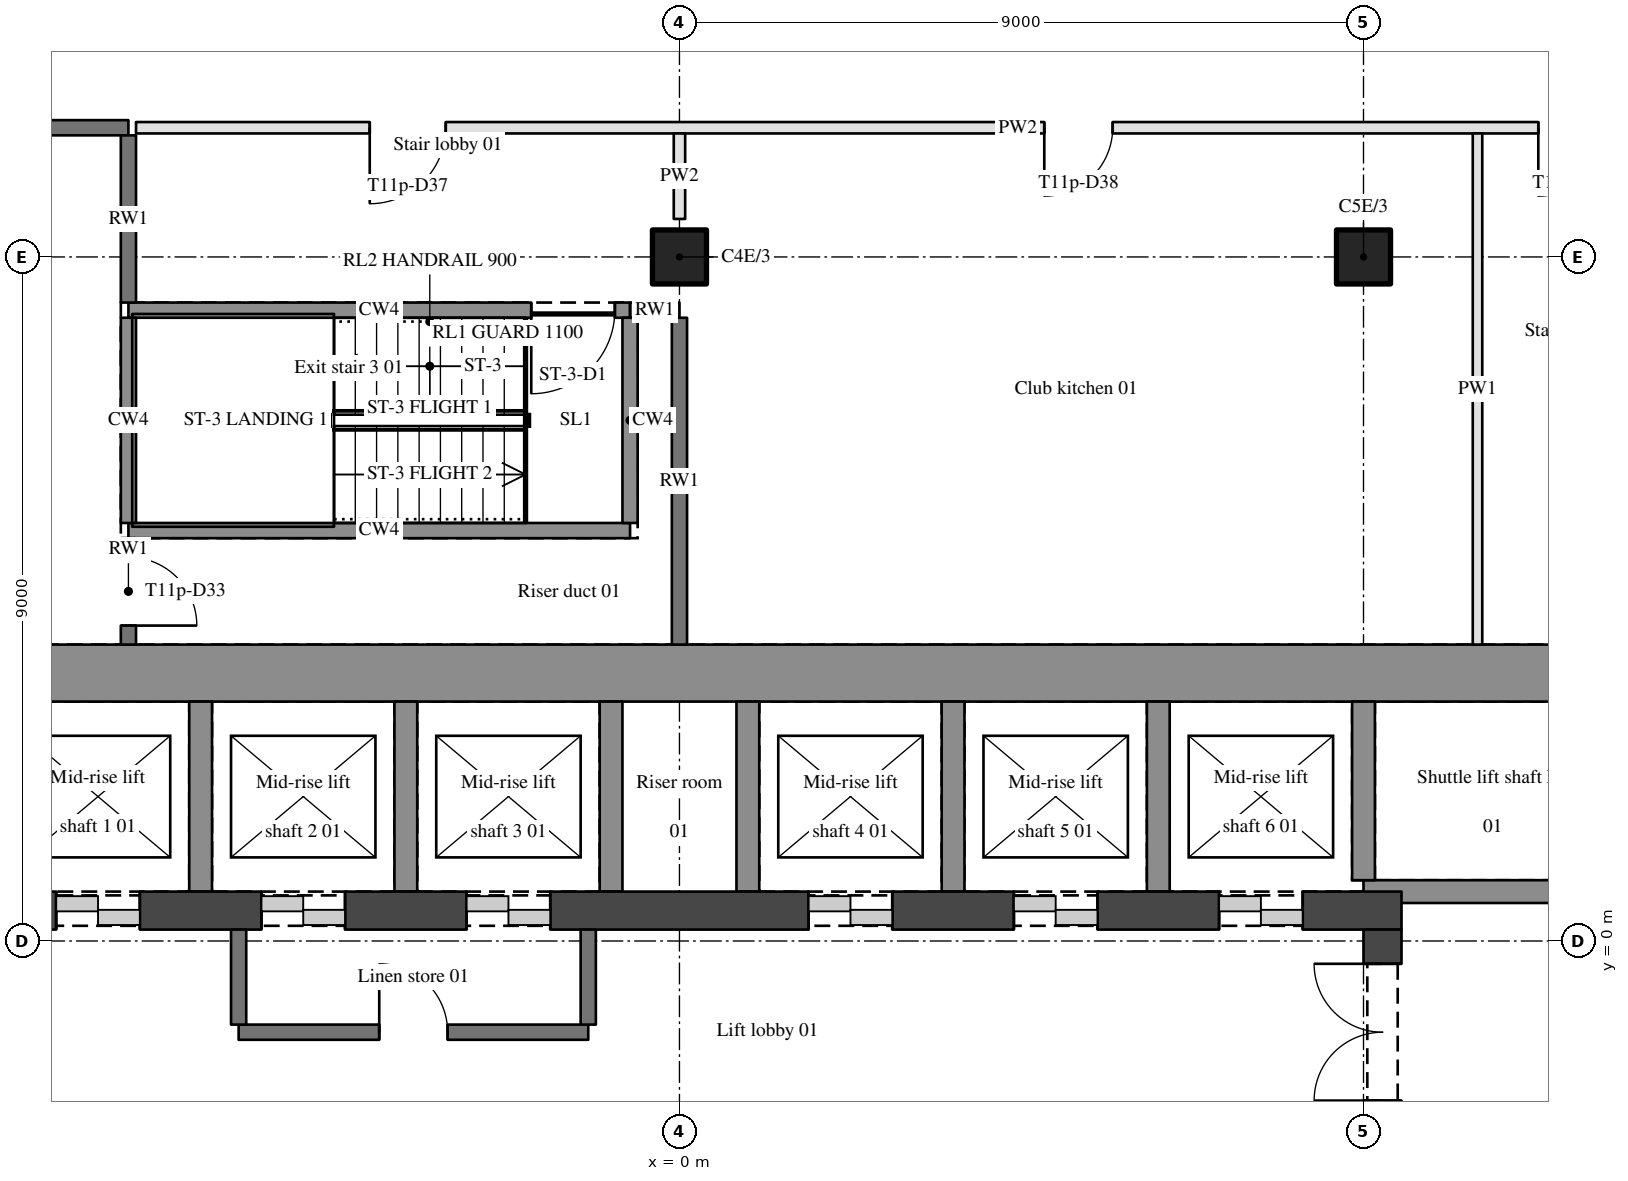
"""IFC4 building model, lengths in metres.
Left out: names, types, materials, properties, quantities, classifications, styles, units other than length and angle.
Written with IfcOpenShell. Run it as: python <this file> out.ifc"""

import sys

from ifc_helpers import new_model, si_unit, direction, frame, frame_2d, origin, origin_2d, place, context, subcontext, project, spatial, rectangle, hollow_circle, extrude, element, fill, save


model = new_model("IFC4")
c1 = context("Model", 3, precision=1e-05, world=origin(), true_north=direction((0.0, 1.0)))
c2 = subcontext(c1, "Body", "Model", "MODEL_VIEW")
j1 = project(units=[si_unit("LENGTHUNIT", "METRE"), si_unit("PLANEANGLEUNIT", "RADIAN")], contexts=[c1])
p1 = place(None, origin())
s1 = spatial("IfcSite", under=j1, at=p1, CompositionType="ELEMENT")
p2 = place(p1, origin())
s2 = spatial("IfcBuilding", under=s1, at=p2, CompositionType="ELEMENT")
p3 = place(p2, frame((0.0, 0.0, 158.9)))
s3 = spatial("IfcBuildingStorey", under=s2, at=p3, CompositionType="ELEMENT", Elevation=158.9)
for number, where, z_axis, x_axis in (
    (1, (0.0, 9.0, 0.0), (0.0, 0.0, 1.0), (1.0, 0.0, 0.0)),
    (2, (9.0, 9.0, 0.0), (0.0, 0.0, 1.0), (1.0, 0.0, 0.0)),
):
    element("IfcColumn", number, at=place(p3, frame(where, z_axis=z_axis, x_axis=x_axis)), inside=s3, PredefinedType="COLUMN", context=c2, shape_type="SweptSolid", body=[
        extrude(hollow_circle(Radius=0.355, WallThickness=0.032, at=origin_2d()), origin(), (0.0, 0.0, 1.0), 3.4),
    ])
p4 = place(p3, frame((-13.0, 3.525, 0.0), z_axis=(0.0, 0.0, 1.0), x_axis=(1.0, 0.0, 0.0)))
e3 = element("IfcWall", 3, at=p4, inside=s3, PredefinedType="SHEAR", context=c2, shape_type="SweptSolid", body=[
    extrude(rectangle(XDim=26.0, YDim=0.75, at=frame_2d((13.0, 0.0))), origin(), (0.0, 0.0, 1.0), 3.4),
])
p5 = place(p3, frame((-9.5, 0.4, 0.0), z_axis=(0.0, 0.0, 1.0), x_axis=(1.0, 0.0, 0.0)))
e4 = element("IfcWall", 4, at=p5, inside=s3, PredefinedType="SHEAR", context=c2, shape_type="SweptSolid", body=[
    extrude(rectangle(XDim=19.0, YDim=0.5, at=frame_2d((9.5, 0.0))), origin(), (0.0, 0.0, 1.0), 3.4),
])
p6 = place(p5, frame((1.3, 0.0, 0.0)))
e5 = element("IfcOpeningElement", 5, at=p6, cuts=e4, PredefinedType="OPENING", context=c2, shape_type="SweptSolid", body=[
    extrude(rectangle(XDim=1.1, YDim=2.1, at=frame_2d((0.55, 1.05))), frame((0.0, 0.26, 0.0), z_axis=(0.0, -1.0, 0.0), x_axis=(1.0, 0.0, 0.0)), (0.0, 0.0, 1.0), 0.52),
])
p7 = place(p5, frame((4.0, 0.0, 0.0)))
e6 = element("IfcOpeningElement", 6, at=p7, cuts=e4, PredefinedType="OPENING", context=c2, shape_type="SweptSolid", body=[
    extrude(rectangle(XDim=1.1, YDim=2.1, at=frame_2d((0.55, 1.05))), frame((0.0, 0.26, 0.0), z_axis=(0.0, -1.0, 0.0), x_axis=(1.0, 0.0, 0.0)), (0.0, 0.0, 1.0), 0.52),
])
p8 = place(p5, frame((6.7, 0.0, 0.0)))
e7 = element("IfcOpeningElement", 7, at=p8, cuts=e4, PredefinedType="OPENING", context=c2, shape_type="SweptSolid", body=[
    extrude(rectangle(XDim=1.1, YDim=2.1, at=frame_2d((0.55, 1.05))), frame((0.0, 0.26, 0.0), z_axis=(0.0, -1.0, 0.0), x_axis=(1.0, 0.0, 0.0)), (0.0, 0.0, 1.0), 0.52),
])
p9 = place(p5, frame((11.2, 0.0, 0.0)))
e8 = element("IfcOpeningElement", 8, at=p9, cuts=e4, PredefinedType="OPENING", context=c2, shape_type="SweptSolid", body=[
    extrude(rectangle(XDim=1.1, YDim=2.1, at=frame_2d((0.55, 1.05))), frame((0.0, 0.26, 0.0), z_axis=(0.0, -1.0, 0.0), x_axis=(1.0, 0.0, 0.0)), (0.0, 0.0, 1.0), 0.52),
])
p10 = place(p5, frame((13.9, 0.0, 0.0)))
e9 = element("IfcOpeningElement", 9, at=p10, cuts=e4, PredefinedType="OPENING", context=c2, shape_type="SweptSolid", body=[
    extrude(rectangle(XDim=1.1, YDim=2.1, at=frame_2d((0.55, 1.05))), frame((0.0, 0.26, 0.0), z_axis=(0.0, -1.0, 0.0), x_axis=(1.0, 0.0, 0.0)), (0.0, 0.0, 1.0), 0.52),
])
p11 = place(p5, frame((16.6, 0.0, 0.0)))
e10 = element("IfcOpeningElement", 10, at=p11, cuts=e4, PredefinedType="OPENING", context=c2, shape_type="SweptSolid", body=[
    extrude(rectangle(XDim=1.1, YDim=2.1, at=frame_2d((0.55, 1.05))), frame((0.0, 0.26, 0.0), z_axis=(0.0, -1.0, 0.0), x_axis=(1.0, 0.0, 0.0)), (0.0, 0.0, 1.0), 0.52),
])
p12 = place(p3, frame((9.25, -11.5, 0.0), z_axis=(0.0, 0.0, 1.0), x_axis=(0.0, 1.0, 0.0)))
e11 = element("IfcWall", 11, at=p12, inside=s3, PredefinedType="SHEAR", context=c2, shape_type="SweptSolid", body=[
    extrude(rectangle(XDim=11.65, YDim=0.5, at=frame_2d((5.825, 0.0))), origin(), (0.0, 0.0, 1.0), 3.4),
])
p13 = place(p12, frame((9.4, 0.0, 0.0)))
e12 = element("IfcOpeningElement", 12, at=p13, cuts=e11, PredefinedType="OPENING", context=c2, shape_type="SweptSolid", body=[
    extrude(rectangle(XDim=1.8, YDim=2.1, at=frame_2d((0.9, 1.05))), frame((0.0, 0.26, 0.0), z_axis=(0.0, -1.0, 0.0), x_axis=(1.0, 0.0, 0.0)), (0.0, 0.0, 1.0), 0.52),
])
p14 = place(p12, frame((5.25, 0.0, 0.0)))
e13 = element("IfcOpeningElement", 13, at=p14, cuts=e11, PredefinedType="OPENING", context=c2, shape_type="SweptSolid", body=[
    extrude(rectangle(XDim=1.1, YDim=2.1, at=frame_2d((0.55, 1.05))), frame((0.0, 0.26, 0.0), z_axis=(0.0, -1.0, 0.0), x_axis=(1.0, 0.0, 0.0)), (0.0, 0.0, 1.0), 0.52),
])
p15 = place(p3, frame((-5.8, -1.2, 0.0), z_axis=(0.0, 0.0, 1.0), x_axis=(1.0, 0.0, 0.0)))
e14 = element("IfcWall", 14, at=p15, inside=s3, PredefinedType="SOLIDWALL", context=c2, shape_type="SweptSolid", body=[
    extrude(rectangle(XDim=4.6, YDim=0.2, at=frame_2d((2.3, 0.0))), origin(), (0.0, 0.0, 1.0), 3.1),
])
p16 = place(p15, frame((1.85, 0.0, 0.0)))
e15 = element("IfcOpeningElement", 15, at=p16, cuts=e14, PredefinedType="OPENING", context=c2, shape_type="SweptSolid", body=[
    extrude(rectangle(XDim=0.9, YDim=2.1, at=frame_2d((0.45, 1.05))), frame((0.0, 0.11, 0.0), z_axis=(0.0, -1.0, 0.0), x_axis=(1.0, 0.0, 0.0)), (0.0, 0.0, 1.0), 0.22),
])
p17 = place(p3, frame((12.25, 0.65, 0.0), z_axis=(0.0, 0.0, 1.0), x_axis=(-1.0, 0.0, 0.0)))
e16 = element("IfcWall", 16, at=p17, inside=s3, PredefinedType="SHEAR", context=c2, shape_type="SweptSolid", body=[
    extrude(rectangle(XDim=3.25, YDim=0.3, at=frame_2d((1.625, 0.0))), origin(), (0.0, 0.0, 1.0), 3.4),
])
p18 = place(p3, frame((-7.25, 5.4, 0.0), z_axis=(0.0, 0.0, 1.0), x_axis=(1.0, 0.0, 0.0)))
e17 = element("IfcWall", 17, at=p18, inside=s3, PredefinedType="SHEAR", context=c2, shape_type="SweptSolid", body=[
    extrude(rectangle(XDim=6.6, YDim=0.2, at=frame_2d((3.3, 0.0))), origin(), (0.0, 0.0, 1.0), 3.4),
])
p19 = place(p3, frame((-0.65, 8.3, 0.0), z_axis=(0.0, 0.0, 1.0), x_axis=(-1.0, 0.0, 0.0)))
e18 = element("IfcWall", 18, at=p19, inside=s3, PredefinedType="SHEAR", context=c2, shape_type="SweptSolid", body=[
    extrude(rectangle(XDim=6.6, YDim=0.2, at=frame_2d((3.3, 0.0))), origin(), (0.0, 0.0, 1.0), 3.4),
])
p20 = place(p19, frame((0.2, 0.0, 0.0)))
e19 = element("IfcOpeningElement", 19, at=p20, cuts=e18, PredefinedType="OPENING", context=c2, shape_type="SweptSolid", body=[
    extrude(rectangle(XDim=1.1, YDim=2.1, at=frame_2d((0.55, 1.05))), frame((0.0, 0.11, 0.0), z_axis=(0.0, -1.0, 0.0), x_axis=(1.0, 0.0, 0.0)), (0.0, 0.0, 1.0), 0.22),
])
p21 = place(p3, frame((-0.65, 8.3, 0.0), z_axis=(0.0, 0.0, 1.0), x_axis=(1.0, 0.0, 0.0)))
e20 = element("IfcWall", 20, at=p21, inside=s3, PredefinedType="SOLIDWALL", context=c2, shape_type="SweptSolid", body=[
    extrude(rectangle(XDim=0.65, YDim=0.2, at=frame_2d((0.325, 0.0))), origin(), (0.0, 0.0, 1.0), 2.46),
])
p22 = place(p3, frame((-7.25, 10.7, 0.0), z_axis=(0.0, 0.0, 1.0), x_axis=(-1.0, 0.0, 0.0)))
e21 = element("IfcWall", 21, at=p22, inside=s3, PredefinedType="SOLIDWALL", context=c2, shape_type="SweptSolid", body=[
    extrude(rectangle(XDim=5.75, YDim=0.2, at=frame_2d((2.875, 0.0))), origin(), (0.0, 0.0, 1.0), 2.46),
])
p23 = place(p22, frame((2.425, 0.0, 0.0)))
e22 = element("IfcOpeningElement", 22, at=p23, cuts=e21, PredefinedType="OPENING", context=c2, shape_type="SweptSolid", body=[
    extrude(rectangle(XDim=0.9, YDim=2.1, at=frame_2d((0.45, 1.05))), frame((0.0, 0.11, 0.0), z_axis=(0.0, -1.0, 0.0), x_axis=(1.0, 0.0, 0.0)), (0.0, 0.0, 1.0), 0.22),
])
p24 = place(p3, frame((16.05, 10.7, 0.0), z_axis=(0.0, 0.0, 1.0), x_axis=(-1.0, 0.0, 0.0)))
e23 = element("IfcWall", 23, at=p24, inside=s3, PredefinedType="PARTITIONING", context=c2, shape_type="SweptSolid", body=[
    extrude(rectangle(XDim=23.2, YDim=0.15, at=frame_2d((11.6, 0.0))), origin(), (0.0, 0.0, 1.0), 2.46),
])
p25 = place(p24, frame((19.125, 0.0, 0.0)))
e24 = element("IfcOpeningElement", 24, at=p25, cuts=e23, PredefinedType="OPENING", context=c2, shape_type="SweptSolid", body=[
    extrude(rectangle(XDim=1.0, YDim=2.1, at=frame_2d((0.5, 1.05))), frame((0.0, 0.085, 0.0), z_axis=(0.0, -1.0, 0.0), x_axis=(1.0, 0.0, 0.0)), (0.0, 0.0, 1.0), 0.17),
])
p26 = place(p24, frame((10.35, 0.0, 0.0)))
e25 = element("IfcOpeningElement", 25, at=p26, cuts=e23, PredefinedType="OPENING", context=c2, shape_type="SweptSolid", body=[
    extrude(rectangle(XDim=0.9, YDim=2.1, at=frame_2d((0.45, 1.05))), frame((0.0, 0.085, 0.0), z_axis=(0.0, -1.0, 0.0), x_axis=(1.0, 0.0, 0.0)), (0.0, 0.0, 1.0), 0.17),
])
p27 = place(p24, frame((3.85, 0.0, 0.0)))
e26 = element("IfcOpeningElement", 26, at=p27, cuts=e23, PredefinedType="OPENING", context=c2, shape_type="SweptSolid", body=[
    extrude(rectangle(XDim=0.9, YDim=2.1, at=frame_2d((0.45, 1.05))), frame((0.0, 0.085, 0.0), z_axis=(0.0, -1.0, 0.0), x_axis=(1.0, 0.0, 0.0)), (0.0, 0.0, 1.0), 0.17),
])
p28 = place(p24, frame((1.075, 0.0, 0.0)))
e27 = element("IfcOpeningElement", 27, at=p28, cuts=e23, PredefinedType="OPENING", context=c2, shape_type="SweptSolid", body=[
    extrude(rectangle(XDim=0.9, YDim=2.1, at=frame_2d((0.45, 1.05))), frame((0.0, 0.085, 0.0), z_axis=(0.0, -1.0, 0.0), x_axis=(1.0, 0.0, 0.0)), (0.0, 0.0, 1.0), 0.17),
])
p29 = place(p3, frame((-7.25, 5.3, 0.0), z_axis=(0.0, 0.0, 1.0), x_axis=(0.0, -1.0, 0.0)))
e28 = element("IfcWall", 28, at=p29, inside=s3, PredefinedType="SOLIDWALL", context=c2, shape_type="SweptSolid", body=[
    extrude(rectangle(XDim=1.4, YDim=0.2, at=frame_2d((0.7, 0.0))), origin(), (0.0, 0.0, 1.0), 2.46),
])
p30 = place(p29, frame((0.25, 0.0, 0.0)))
e29 = element("IfcOpeningElement", 29, at=p30, cuts=e28, PredefinedType="OPENING", context=c2, shape_type="SweptSolid", body=[
    extrude(rectangle(XDim=0.9, YDim=2.1, at=frame_2d((0.45, 1.05))), frame((0.0, 0.11, 0.0), z_axis=(0.0, -1.0, 0.0), x_axis=(1.0, 0.0, 0.0)), (0.0, 0.0, 1.0), 0.22),
])
p31 = place(p3, frame((-7.25, 5.5, 0.0), z_axis=(0.0, 0.0, 1.0), x_axis=(0.0, 1.0, 0.0)))
e30 = element("IfcWall", 30, at=p31, inside=s3, PredefinedType="SHEAR", context=c2, shape_type="SweptSolid", body=[
    extrude(rectangle(XDim=2.7, YDim=0.2, at=frame_2d((1.35, 0.0))), origin(), (0.0, 0.0, 1.0), 3.4),
])
p32 = place(p3, frame((-7.25, 8.4, 0.0), z_axis=(0.0, 0.0, 1.0), x_axis=(0.0, 1.0, 0.0)))
e31 = element("IfcWall", 31, at=p32, inside=s3, PredefinedType="SOLIDWALL", context=c2, shape_type="SweptSolid", body=[
    extrude(rectangle(XDim=2.2, YDim=0.2, at=frame_2d((1.1, 0.0))), origin(), (0.0, 0.0, 1.0), 2.46),
])
p33 = place(p3, frame((-6.3, 0.65, 0.0), z_axis=(0.0, 0.0, 1.0), x_axis=(0.0, 1.0, 0.0)))
e32 = element("IfcWall", 32, at=p33, inside=s3, PredefinedType="SHEAR", context=c2, shape_type="SweptSolid", body=[
    extrude(rectangle(XDim=2.5, YDim=0.3, at=frame_2d((1.25, 0.0))), origin(), (0.0, 0.0, 1.0), 3.4),
])
p34 = place(p3, frame((-5.8, -1.1, 0.0), z_axis=(0.0, 0.0, 1.0), x_axis=(0.0, 1.0, 0.0)))
e33 = element("IfcWall", 33, at=p34, inside=s3, PredefinedType="SOLIDWALL", context=c2, shape_type="SweptSolid", body=[
    extrude(rectangle(XDim=1.25, YDim=0.2, at=frame_2d((0.625, 0.0))), origin(), (0.0, 0.0, 1.0), 3.1),
])
p35 = place(p3, frame((-3.6, 0.65, 0.0), z_axis=(0.0, 0.0, 1.0), x_axis=(0.0, 1.0, 0.0)))
e34 = element("IfcWall", 34, at=p35, inside=s3, PredefinedType="SHEAR", context=c2, shape_type="SweptSolid", body=[
    extrude(rectangle(XDim=2.5, YDim=0.3, at=frame_2d((1.25, 0.0))), origin(), (0.0, 0.0, 1.0), 3.4),
])
p36 = place(p3, frame((-1.2, -1.1, 0.0), z_axis=(0.0, 0.0, 1.0), x_axis=(0.0, 1.0, 0.0)))
e35 = element("IfcWall", 35, at=p36, inside=s3, PredefinedType="SOLIDWALL", context=c2, shape_type="SweptSolid", body=[
    extrude(rectangle(XDim=1.25, YDim=0.2, at=frame_2d((0.625, 0.0))), origin(), (0.0, 0.0, 1.0), 3.1),
])
p37 = place(p3, frame((-0.9, 0.65, 0.0), z_axis=(0.0, 0.0, 1.0), x_axis=(0.0, 1.0, 0.0)))
e36 = element("IfcWall", 36, at=p37, inside=s3, PredefinedType="SHEAR", context=c2, shape_type="SweptSolid", body=[
    extrude(rectangle(XDim=2.5, YDim=0.3, at=frame_2d((1.25, 0.0))), origin(), (0.0, 0.0, 1.0), 3.4),
])
p38 = place(p3, frame((-0.65, 5.5, 0.0), z_axis=(0.0, 0.0, 1.0), x_axis=(0.0, 1.0, 0.0)))
e37 = element("IfcWall", 37, at=p38, inside=s3, PredefinedType="SHEAR", context=c2, shape_type="SweptSolid", body=[
    extrude(rectangle(XDim=2.7, YDim=0.2, at=frame_2d((1.35, 0.0))), origin(), (0.0, 0.0, 1.0), 3.4),
])
p39 = place(p3, frame((0.0, 3.9, 0.0), z_axis=(0.0, 0.0, 1.0), x_axis=(0.0, 1.0, 0.0)))
e38 = element("IfcWall", 38, at=p39, inside=s3, PredefinedType="SOLIDWALL", context=c2, shape_type="SweptSolid", body=[
    extrude(rectangle(XDim=4.3, YDim=0.2, at=frame_2d((2.15, 0.0))), origin(), (0.0, 0.0, 1.0), 2.46),
])
p40 = place(p3, frame((0.0, 9.5, 0.0), z_axis=(0.0, 0.0, 1.0), x_axis=(0.0, 1.0, 0.0)))
e39 = element("IfcWall", 39, at=p40, inside=s3, PredefinedType="PARTITIONING", context=c2, shape_type="SweptSolid", body=[
    extrude(rectangle(XDim=1.125, YDim=0.15, at=frame_2d((0.562, 0.0))), origin(), (0.0, 0.0, 1.0), 2.46),
])
for number, where, z_axis, x_axis in (
    (40, (0.9, 0.65, 0.0), (0.0, 0.0, 1.0), (0.0, 1.0, 0.0)),
    (41, (3.6, 0.65, 0.0), (0.0, 0.0, 1.0), (0.0, 1.0, 0.0)),
    (42, (6.3, 0.65, 0.0), (0.0, 0.0, 1.0), (0.0, 1.0, 0.0)),
):
    element("IfcWall", number, at=place(p3, frame(where, z_axis=z_axis, x_axis=x_axis)), inside=s3, PredefinedType="SHEAR", context=c2, shape_type="SweptSolid", body=[
        extrude(rectangle(XDim=2.5, YDim=0.3, at=frame_2d((1.25, 0.0))), origin(), (0.0, 0.0, 1.0), 3.4),
    ])
p41 = place(p3, frame((9.0, 0.8, 0.0), z_axis=(0.0, 0.0, 1.0), x_axis=(0.0, 1.0, 0.0)))
e43 = element("IfcWall", 43, at=p41, inside=s3, PredefinedType="SHEAR", context=c2, shape_type="SweptSolid", body=[
    extrude(rectangle(XDim=2.35, YDim=0.3, at=frame_2d((1.175, 0.0))), origin(), (0.0, 0.0, 1.0), 3.4),
])
p42 = place(p3, frame((10.5, 3.9, 0.0), z_axis=(0.0, 0.0, 1.0), x_axis=(0.0, 1.0, 0.0)))
e44 = element("IfcWall", 44, at=p42, inside=s3, PredefinedType="PARTITIONING", context=c2, shape_type="SweptSolid", body=[
    extrude(rectangle(XDim=6.725, YDim=0.125, at=frame_2d((3.363, 0.0))), origin(), (0.0, 0.0, 1.0), 2.46),
])
p43 = place(p25, origin())
e45 = element("IfcDoor", 45, at=p43, inside=s3, OperationType="SINGLE_SWING_RIGHT", PredefinedType="DOOR", context=c2, shape_type="SweptSolid", body=[
    extrude(rectangle(XDim=1.0, YDim=2.1, at=frame_2d((0.5, 1.05))), frame((0.0, 0.025, 0.0), z_axis=(0.0, -1.0, 0.0), x_axis=(1.0, 0.0, 0.0)), (0.0, 0.0, 1.0), 0.05),
])
fill(e24, e45)
p44 = place(p13, origin())
e46 = element("IfcDoor", 46, at=p44, inside=s3, OperationType="DOUBLE_DOOR_SINGLE_SWING", PredefinedType="DOOR", context=c2, shape_type="SweptSolid", body=[
    extrude(rectangle(XDim=1.8, YDim=2.1, at=frame_2d((0.9, 1.05))), frame((0.0, 0.025, 0.0), z_axis=(0.0, -1.0, 0.0), x_axis=(1.0, 0.0, 0.0)), (0.0, 0.0, 1.0), 0.05),
])
fill(e12, e46)
p45 = place(p20, origin())
e47 = element("IfcDoor", 47, at=p45, inside=s3, OperationType="SINGLE_SWING_RIGHT", PredefinedType="DOOR", context=c2, shape_type="SweptSolid", body=[
    extrude(rectangle(XDim=1.1, YDim=2.1, at=frame_2d((0.55, 1.05))), frame((0.0, 0.025, 0.0), z_axis=(0.0, -1.0, 0.0), x_axis=(1.0, 0.0, 0.0)), (0.0, 0.0, 1.0), 0.05),
])
fill(e19, e47)
p46 = place(p30, origin())
e48 = element("IfcDoor", 48, at=p46, inside=s3, OperationType="SINGLE_SWING_RIGHT", PredefinedType="DOOR", context=c2, shape_type="SweptSolid", body=[
    extrude(rectangle(XDim=0.9, YDim=2.1, at=frame_2d((0.45, 1.05))), frame((0.0, 0.025, 0.0), z_axis=(0.0, -1.0, 0.0), x_axis=(1.0, 0.0, 0.0)), (0.0, 0.0, 1.0), 0.05),
])
fill(e29, e48)
p47 = place(p26, origin())
e49 = element("IfcDoor", 49, at=p47, inside=s3, OperationType="SINGLE_SWING_RIGHT", PredefinedType="DOOR", context=c2, shape_type="SweptSolid", body=[
    extrude(rectangle(XDim=0.9, YDim=2.1, at=frame_2d((0.45, 1.05))), frame((0.0, 0.025, 0.0), z_axis=(0.0, -1.0, 0.0), x_axis=(1.0, 0.0, 0.0)), (0.0, 0.0, 1.0), 0.05),
])
fill(e25, e49)
p48 = place(p27, origin())
e50 = element("IfcDoor", 50, at=p48, inside=s3, OperationType="SINGLE_SWING_RIGHT", PredefinedType="DOOR", context=c2, shape_type="SweptSolid", body=[
    extrude(rectangle(XDim=0.9, YDim=2.1, at=frame_2d((0.45, 1.05))), frame((0.0, 0.025, 0.0), z_axis=(0.0, -1.0, 0.0), x_axis=(1.0, 0.0, 0.0)), (0.0, 0.0, 1.0), 0.05),
])
fill(e26, e50)
p49 = place(p16, origin())
e51 = element("IfcDoor", 51, at=p49, inside=s3, OperationType="SINGLE_SWING_LEFT", PredefinedType="DOOR", context=c2, shape_type="SweptSolid", body=[
    extrude(rectangle(XDim=0.9, YDim=2.1, at=frame_2d((0.45, 1.05))), frame((0.0, 0.025, 0.0), z_axis=(0.0, -1.0, 0.0), x_axis=(1.0, 0.0, 0.0)), (0.0, 0.0, 1.0), 0.05),
])
fill(e15, e51)
p50 = place(p6, origin())
e52 = element("IfcDoor", 52, at=p50, inside=s3, OperationType="DOUBLE_DOOR_SLIDING", PredefinedType="DOOR", context=c2, shape_type="SweptSolid", body=[
    extrude(rectangle(XDim=1.1, YDim=2.1, at=frame_2d((0.55, 1.05))), frame((0.0, 0.025, 0.0), z_axis=(0.0, -1.0, 0.0), x_axis=(1.0, 0.0, 0.0)), (0.0, 0.0, 1.0), 0.05),
])
fill(e5, e52)
p51 = place(p7, origin())
e53 = element("IfcDoor", 53, at=p51, inside=s3, OperationType="DOUBLE_DOOR_SLIDING", PredefinedType="DOOR", context=c2, shape_type="SweptSolid", body=[
    extrude(rectangle(XDim=1.1, YDim=2.1, at=frame_2d((0.55, 1.05))), frame((0.0, 0.025, 0.0), z_axis=(0.0, -1.0, 0.0), x_axis=(1.0, 0.0, 0.0)), (0.0, 0.0, 1.0), 0.05),
])
fill(e6, e53)
p52 = place(p8, origin())
e54 = element("IfcDoor", 54, at=p52, inside=s3, OperationType="DOUBLE_DOOR_SLIDING", PredefinedType="DOOR", context=c2, shape_type="SweptSolid", body=[
    extrude(rectangle(XDim=1.1, YDim=2.1, at=frame_2d((0.55, 1.05))), frame((0.0, 0.025, 0.0), z_axis=(0.0, -1.0, 0.0), x_axis=(1.0, 0.0, 0.0)), (0.0, 0.0, 1.0), 0.05),
])
fill(e7, e54)
p53 = place(p9, origin())
e55 = element("IfcDoor", 55, at=p53, inside=s3, OperationType="DOUBLE_DOOR_SLIDING", PredefinedType="DOOR", context=c2, shape_type="SweptSolid", body=[
    extrude(rectangle(XDim=1.1, YDim=2.1, at=frame_2d((0.55, 1.05))), frame((0.0, 0.025, 0.0), z_axis=(0.0, -1.0, 0.0), x_axis=(1.0, 0.0, 0.0)), (0.0, 0.0, 1.0), 0.05),
])
fill(e8, e55)
p54 = place(p10, origin())
e56 = element("IfcDoor", 56, at=p54, inside=s3, OperationType="DOUBLE_DOOR_SLIDING", PredefinedType="DOOR", context=c2, shape_type="SweptSolid", body=[
    extrude(rectangle(XDim=1.1, YDim=2.1, at=frame_2d((0.55, 1.05))), frame((0.0, 0.025, 0.0), z_axis=(0.0, -1.0, 0.0), x_axis=(1.0, 0.0, 0.0)), (0.0, 0.0, 1.0), 0.05),
])
fill(e9, e56)
p55 = place(p11, origin())
e57 = element("IfcDoor", 57, at=p55, inside=s3, OperationType="DOUBLE_DOOR_SLIDING", PredefinedType="DOOR", context=c2, shape_type="SweptSolid", body=[
    extrude(rectangle(XDim=1.1, YDim=2.1, at=frame_2d((0.55, 1.05))), frame((0.0, 0.025, 0.0), z_axis=(0.0, -1.0, 0.0), x_axis=(1.0, 0.0, 0.0)), (0.0, 0.0, 1.0), 0.05),
])
fill(e10, e57)
save(model, sys.argv[1])
